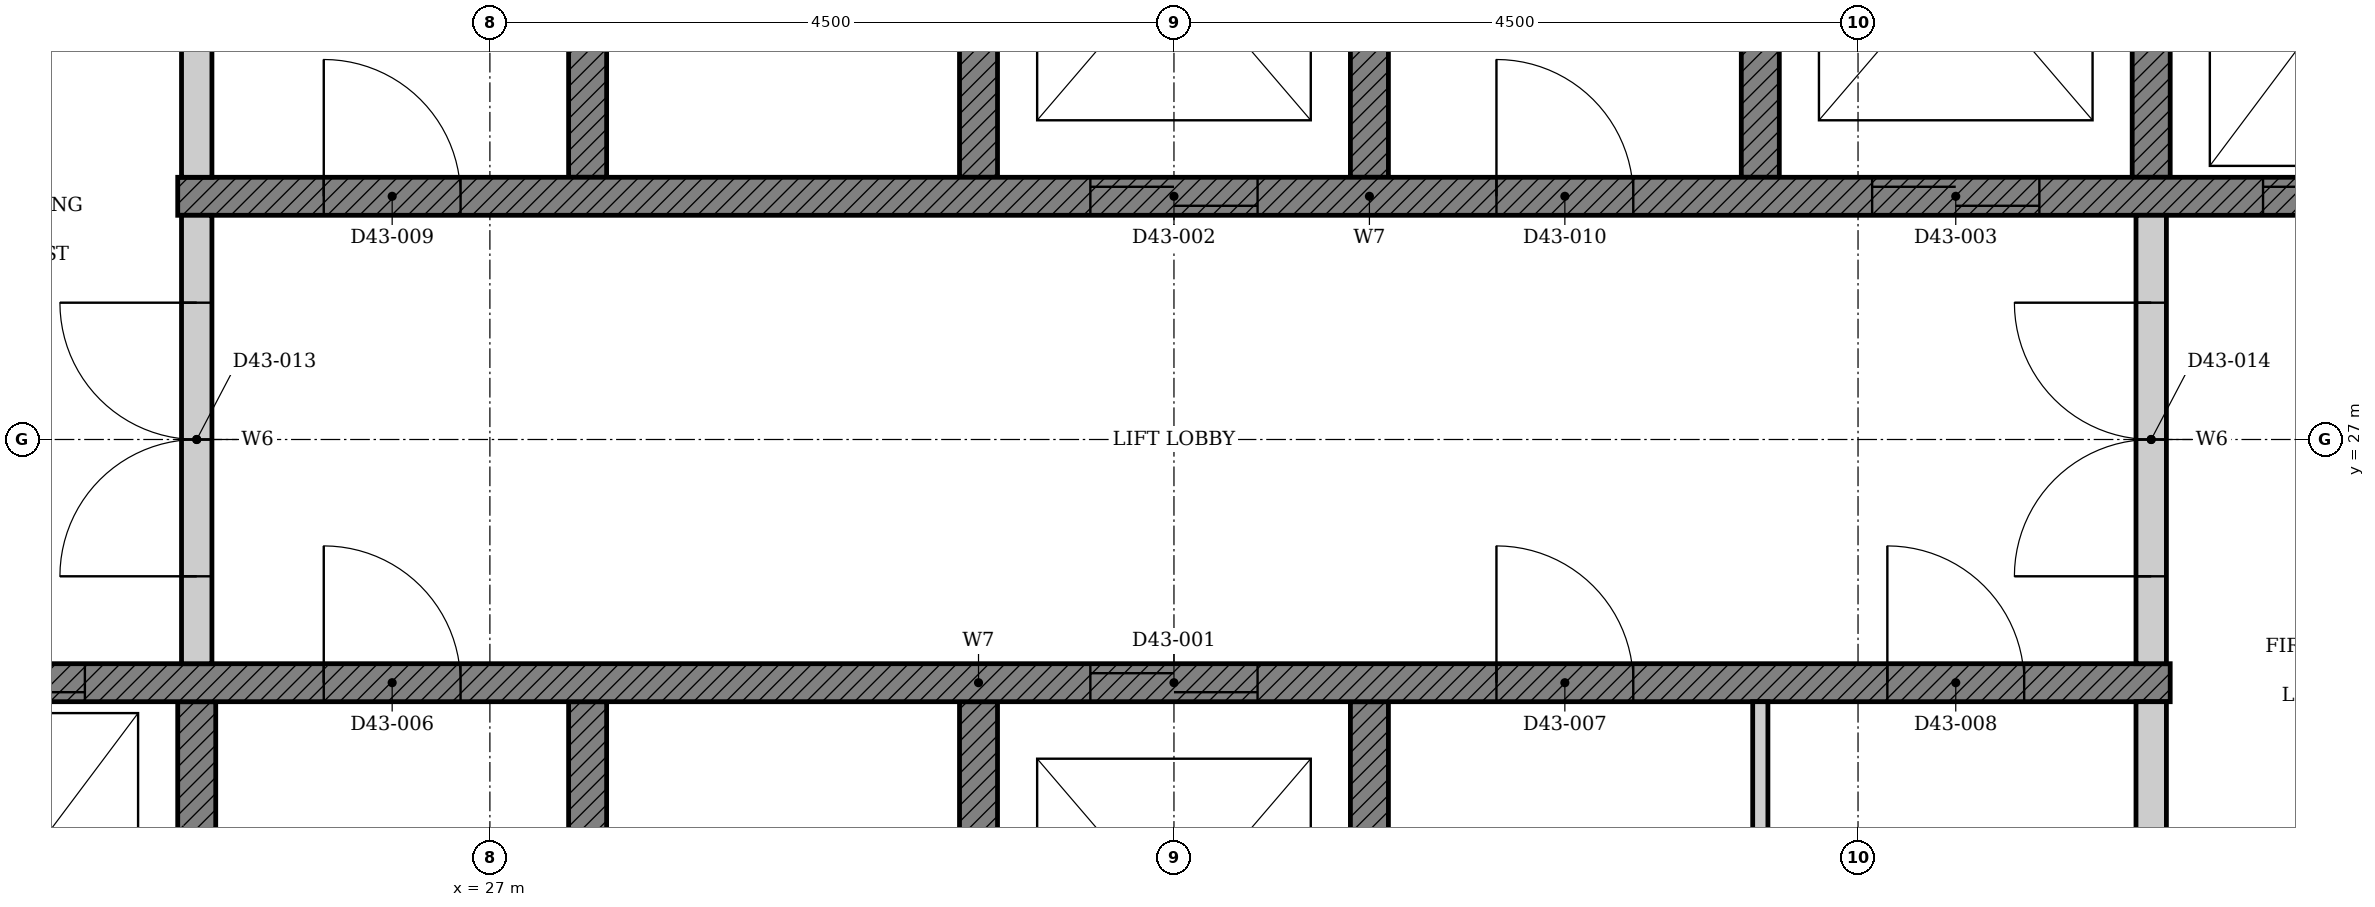
"""IFC4 building model, lengths in metres.
Left out: names, types, materials, properties, quantities, classifications, styles, units other than length and angle.
Written with IfcOpenShell. Run it as: python <this file> out.ifc"""

import sys

from ifc_helpers import new_model, si_unit, direction, frame, frame_2d, origin, place, context, subcontext, project, spatial, polyline, rectangle, outline, extrude, element, fill, save


model = new_model("IFC4")
c1 = context("Model", 3, precision=1e-05, world=origin(), true_north=direction((0.0, 1.0)))
c2 = subcontext(c1, "Body", "Model", "MODEL_VIEW")
j1 = project(units=[si_unit("LENGTHUNIT", "METRE"), si_unit("PLANEANGLEUNIT", "RADIAN")], contexts=[c1])
p1 = place(None, origin())
s1 = spatial("IfcSite", under=j1, at=p1, CompositionType="ELEMENT")
p2 = place(p1, origin())
s2 = spatial("IfcBuilding", under=s1, at=p2, CompositionType="ELEMENT")
p3 = place(p2, frame((0.0, 0.0, 172.8)))
s3 = spatial("IfcBuildingStorey", under=s2, at=p3, CompositionType="ELEMENT", Elevation=172.8)
p4 = place(p3, origin())
e1 = element("IfcWall", 1, at=p4, inside=s3, PredefinedType="SHEAR", context=c2, shape_type="SweptSolid", body=[
    extrude(outline(polyline([(22.375, 22.35), (25.197, 22.35), (25.197, 25.275), (24.947, 25.275), (24.947, 22.65), (22.625, 22.65), (22.625, 25.275), (22.375, 25.275), (22.375, 22.35)])), origin(), (0.0, 0.0, 1.0), 3.4),
])
p5 = place(p3, origin())
e2 = element("IfcWall", 2, at=p5, inside=s3, PredefinedType="SHEAR", context=c2, shape_type="SweptSolid", body=[
    extrude(outline(polyline([(27.518, 22.35), (32.911, 22.35), (32.911, 25.275), (32.661, 25.275), (32.661, 22.65), (30.339, 22.65), (30.339, 25.275), (30.089, 25.275), (30.089, 22.65), (27.768, 22.65), (27.768, 25.275), (27.518, 25.275), (27.518, 22.35)])), origin(), (0.0, 0.0, 1.0), 3.4),
])
p6 = place(p3, origin())
e3 = element("IfcWall", 3, at=p6, inside=s3, PredefinedType="SHEAR", context=c2, shape_type="SweptSolid", body=[
    extrude(outline(polyline([(27.518, 28.725), (27.768, 28.725), (27.768, 31.35), (30.089, 31.35), (30.089, 28.725), (30.339, 28.725), (30.339, 31.35), (32.661, 31.35), (32.661, 28.725), (32.911, 28.725), (32.911, 31.65), (27.518, 31.65), (27.518, 28.725)])), origin(), (0.0, 0.0, 1.0), 3.4),
])
p7 = place(p3, origin())
e4 = element("IfcWall", 4, at=p7, inside=s3, PredefinedType="SHEAR", context=c2, shape_type="SweptSolid", body=[
    extrude(outline(polyline([(35.232, 28.725), (35.482, 28.725), (35.482, 31.35), (37.803, 31.35), (37.803, 28.725), (38.053, 28.725), (38.053, 31.35), (40.375, 31.35), (40.375, 28.725), (40.625, 28.725), (40.625, 31.65), (35.232, 31.65), (35.232, 28.725)])), origin(), (0.0, 0.0, 1.0), 3.4),
])
p8 = place(p3, frame((22.375, 25.4, 0.0), z_axis=(0.0, 0.0, 1.0), x_axis=(1.0, 0.0, 0.0)))
e5 = element("IfcWall", 5, at=p8, inside=s3, PredefinedType="SHEAR", context=c2, shape_type="SweptSolid", body=[
    extrude(rectangle(XDim=15.678, YDim=0.25, at=frame_2d((7.839, 0.0))), origin(), (0.0, 0.0, 1.0), 3.4),
])
p9 = place(p8, frame((8.575, 0.0, 0.0)))
e6 = element("IfcOpeningElement", 6, at=p9, cuts=e5, PredefinedType="OPENING", context=c2, shape_type="SweptSolid", body=[
    extrude(rectangle(XDim=1.1, YDim=2.1, at=frame_2d((0.55, 1.05))), frame((0.0, 0.135, 0.0), z_axis=(0.0, -1.0, 0.0), x_axis=(1.0, 0.0, 0.0)), (0.0, 0.0, 1.0), 0.27),
])
p10 = place(p8, frame((0.861, 0.0, 0.0)))
e7 = element("IfcOpeningElement", 7, at=p10, cuts=e5, PredefinedType="OPENING", context=c2, shape_type="SweptSolid", body=[
    extrude(rectangle(XDim=1.1, YDim=2.1, at=frame_2d((0.55, 1.05))), frame((0.0, 0.135, 0.0), z_axis=(0.0, -1.0, 0.0), x_axis=(1.0, 0.0, 0.0)), (0.0, 0.0, 1.0), 0.27),
])
p11 = place(p8, frame((3.532, 0.0, 0.0)))
e8 = element("IfcOpeningElement", 8, at=p11, cuts=e5, PredefinedType="OPENING", context=c2, shape_type="SweptSolid", body=[
    extrude(rectangle(XDim=0.9, YDim=2.1, at=frame_2d((0.45, 1.05))), frame((0.0, 0.135, 0.0), z_axis=(0.0, -1.0, 0.0), x_axis=(1.0, 0.0, 0.0)), (0.0, 0.0, 1.0), 0.27),
])
p12 = place(p8, frame((11.246, 0.0, 0.0)))
e9 = element("IfcOpeningElement", 9, at=p12, cuts=e5, PredefinedType="OPENING", context=c2, shape_type="SweptSolid", body=[
    extrude(rectangle(XDim=0.9, YDim=2.1, at=frame_2d((0.45, 1.05))), frame((0.0, 0.135, 0.0), z_axis=(0.0, -1.0, 0.0), x_axis=(1.0, 0.0, 0.0)), (0.0, 0.0, 1.0), 0.27),
])
p13 = place(p8, frame((13.818, 0.0, 0.0)))
e10 = element("IfcOpeningElement", 10, at=p13, cuts=e5, PredefinedType="OPENING", context=c2, shape_type="SweptSolid", body=[
    extrude(rectangle(XDim=0.9, YDim=2.1, at=frame_2d((0.45, 1.05))), frame((0.0, 0.135, 0.0), z_axis=(0.0, -1.0, 0.0), x_axis=(1.0, 0.0, 0.0)), (0.0, 0.0, 1.0), 0.27),
])
p14 = place(p3, frame((24.947, 28.6, 0.0), z_axis=(0.0, 0.0, 1.0), x_axis=(1.0, 0.0, 0.0)))
e11 = element("IfcWall", 11, at=p14, inside=s3, PredefinedType="SHEAR", context=c2, shape_type="SweptSolid", body=[
    extrude(rectangle(XDim=15.678, YDim=0.25, at=frame_2d((7.839, 0.0))), origin(), (0.0, 0.0, 1.0), 3.4),
])
p15 = place(p14, frame((6.004, 0.0, 0.0)))
e12 = element("IfcOpeningElement", 12, at=p15, cuts=e11, PredefinedType="OPENING", context=c2, shape_type="SweptSolid", body=[
    extrude(rectangle(XDim=1.1, YDim=2.1, at=frame_2d((0.55, 1.05))), frame((0.0, 0.135, 0.0), z_axis=(0.0, -1.0, 0.0), x_axis=(1.0, 0.0, 0.0)), (0.0, 0.0, 1.0), 0.27),
])
p16 = place(p14, frame((11.146, 0.0, 0.0)))
e13 = element("IfcOpeningElement", 13, at=p16, cuts=e11, PredefinedType="OPENING", context=c2, shape_type="SweptSolid", body=[
    extrude(rectangle(XDim=1.1, YDim=2.1, at=frame_2d((0.55, 1.05))), frame((0.0, 0.135, 0.0), z_axis=(0.0, -1.0, 0.0), x_axis=(1.0, 0.0, 0.0)), (0.0, 0.0, 1.0), 0.27),
])
p17 = place(p14, frame((13.718, 0.0, 0.0)))
e14 = element("IfcOpeningElement", 14, at=p17, cuts=e11, PredefinedType="OPENING", context=c2, shape_type="SweptSolid", body=[
    extrude(rectangle(XDim=1.1, YDim=2.1, at=frame_2d((0.55, 1.05))), frame((0.0, 0.135, 0.0), z_axis=(0.0, -1.0, 0.0), x_axis=(1.0, 0.0, 0.0)), (0.0, 0.0, 1.0), 0.27),
])
p18 = place(p14, frame((0.961, 0.0, 0.0)))
e15 = element("IfcOpeningElement", 15, at=p18, cuts=e11, PredefinedType="OPENING", context=c2, shape_type="SweptSolid", body=[
    extrude(rectangle(XDim=0.9, YDim=2.1, at=frame_2d((0.45, 1.05))), frame((0.0, 0.135, 0.0), z_axis=(0.0, -1.0, 0.0), x_axis=(1.0, 0.0, 0.0)), (0.0, 0.0, 1.0), 0.27),
])
p19 = place(p14, frame((8.675, 0.0, 0.0)))
e16 = element("IfcOpeningElement", 16, at=p19, cuts=e11, PredefinedType="OPENING", context=c2, shape_type="SweptSolid", body=[
    extrude(rectangle(XDim=0.9, YDim=2.1, at=frame_2d((0.45, 1.05))), frame((0.0, 0.135, 0.0), z_axis=(0.0, -1.0, 0.0), x_axis=(1.0, 0.0, 0.0)), (0.0, 0.0, 1.0), 0.27),
])
p20 = place(p3, frame((37.928, 22.65, 0.0), z_axis=(0.0, 0.0, 1.0), x_axis=(0.0, 1.0, 0.0)))
e17 = element("IfcWall", 17, at=p20, inside=s3, PredefinedType="PARTITIONING", context=c2, shape_type="SweptSolid", body=[
    extrude(rectangle(XDim=2.625, YDim=0.2, at=frame_2d((1.312, 0.0))), origin(), (0.0, 0.0, 1.0), 3.4),
])
p21 = place(p3, frame((35.357, 22.65, 0.0), z_axis=(0.0, 0.0, 1.0), x_axis=(0.0, 1.0, 0.0)))
e18 = element("IfcWall", 18, at=p21, inside=s3, PredefinedType="PARTITIONING", context=c2, shape_type="SweptSolid", body=[
    extrude(rectangle(XDim=2.625, YDim=0.1, at=frame_2d((1.312, 0.0))), origin(), (0.0, 0.0, 1.0), 3.4),
])
p22 = place(p3, frame((25.072, 28.725, 0.0), z_axis=(0.0, 0.0, 1.0), x_axis=(0.0, 1.0, 0.0)))
e19 = element("IfcWall", 19, at=p22, inside=s3, PredefinedType="PARTITIONING", context=c2, shape_type="SweptSolid", body=[
    extrude(rectangle(XDim=2.625, YDim=0.2, at=frame_2d((1.312, 0.0))), origin(), (0.0, 0.0, 1.0), 3.4),
])
p23 = place(p3, frame((25.072, 25.525, 0.0), z_axis=(0.0, 0.0, 1.0), x_axis=(0.0, 1.0, 0.0)))
e20 = element("IfcWall", 20, at=p23, inside=s3, PredefinedType="PARTITIONING", context=c2, shape_type="SweptSolid", body=[
    extrude(rectangle(XDim=2.95, YDim=0.2, at=frame_2d((1.475, 0.0))), origin(), (0.0, 0.0, 1.0), 3.4),
])
p24 = place(p23, frame((0.575, 0.0, 0.0)))
e21 = element("IfcOpeningElement", 21, at=p24, cuts=e20, PredefinedType="OPENING", context=c2, shape_type="SweptSolid", body=[
    extrude(rectangle(XDim=1.8, YDim=2.1, at=frame_2d((0.9, 1.05))), frame((0.0, 0.11, 0.0), z_axis=(0.0, -1.0, 0.0), x_axis=(1.0, 0.0, 0.0)), (0.0, 0.0, 1.0), 0.22),
])
p25 = place(p3, frame((37.928, 25.525, 0.0), z_axis=(0.0, 0.0, 1.0), x_axis=(0.0, 1.0, 0.0)))
e22 = element("IfcWall", 22, at=p25, inside=s3, PredefinedType="PARTITIONING", context=c2, shape_type="SweptSolid", body=[
    extrude(rectangle(XDim=2.95, YDim=0.2, at=frame_2d((1.475, 0.0))), origin(), (0.0, 0.0, 1.0), 3.4),
])
p26 = place(p25, frame((0.575, 0.0, 0.0)))
e23 = element("IfcOpeningElement", 23, at=p26, cuts=e22, PredefinedType="OPENING", context=c2, shape_type="SweptSolid", body=[
    extrude(rectangle(XDim=1.8, YDim=2.1, at=frame_2d((0.9, 1.05))), frame((0.0, 0.11, 0.0), z_axis=(0.0, -1.0, 0.0), x_axis=(1.0, 0.0, 0.0)), (0.0, 0.0, 1.0), 0.22),
])
p27 = place(p9, origin())
e24 = element("IfcDoor", 24, at=p27, inside=s3, OperationType="DOUBLE_DOOR_SLIDING", PredefinedType="DOOR", context=c2, shape_type="SweptSolid", body=[
    extrude(rectangle(XDim=1.1, YDim=2.1, at=frame_2d((0.55, 1.05))), frame((0.0, 0.025, 0.0), z_axis=(0.0, -1.0, 0.0), x_axis=(1.0, 0.0, 0.0)), (0.0, 0.0, 1.0), 0.05),
])
fill(e6, e24)
p28 = place(p15, origin())
e25 = element("IfcDoor", 25, at=p28, inside=s3, OperationType="DOUBLE_DOOR_SLIDING", PredefinedType="DOOR", context=c2, shape_type="SweptSolid", body=[
    extrude(rectangle(XDim=1.1, YDim=2.1, at=frame_2d((0.55, 1.05))), frame((0.0, 0.025, 0.0), z_axis=(0.0, -1.0, 0.0), x_axis=(1.0, 0.0, 0.0)), (0.0, 0.0, 1.0), 0.05),
])
fill(e12, e25)
p29 = place(p16, origin())
e26 = element("IfcDoor", 26, at=p29, inside=s3, OperationType="DOUBLE_DOOR_SLIDING", PredefinedType="DOOR", context=c2, shape_type="SweptSolid", body=[
    extrude(rectangle(XDim=1.1, YDim=2.1, at=frame_2d((0.55, 1.05))), frame((0.0, 0.025, 0.0), z_axis=(0.0, -1.0, 0.0), x_axis=(1.0, 0.0, 0.0)), (0.0, 0.0, 1.0), 0.05),
])
fill(e13, e26)
p30 = place(p10, origin())
e27 = element("IfcDoor", 27, at=p30, inside=s3, OperationType="DOUBLE_DOOR_SLIDING", PredefinedType="DOOR", context=c2, shape_type="SweptSolid", body=[
    extrude(rectangle(XDim=1.1, YDim=2.1, at=frame_2d((0.55, 1.05))), frame((0.0, 0.025, 0.0), z_axis=(0.0, -1.0, 0.0), x_axis=(1.0, 0.0, 0.0)), (0.0, 0.0, 1.0), 0.05),
])
fill(e7, e27)
p31 = place(p17, origin())
e28 = element("IfcDoor", 28, at=p31, inside=s3, OperationType="DOUBLE_DOOR_SLIDING", PredefinedType="DOOR", context=c2, shape_type="SweptSolid", body=[
    extrude(rectangle(XDim=1.1, YDim=2.1, at=frame_2d((0.55, 1.05))), frame((0.0, 0.025, 0.0), z_axis=(0.0, -1.0, 0.0), x_axis=(1.0, 0.0, 0.0)), (0.0, 0.0, 1.0), 0.05),
])
fill(e14, e28)
p32 = place(p11, origin())
e29 = element("IfcDoor", 29, at=p32, inside=s3, OperationType="SINGLE_SWING_LEFT", PredefinedType="DOOR", context=c2, shape_type="SweptSolid", body=[
    extrude(rectangle(XDim=0.9, YDim=2.1, at=frame_2d((0.45, 1.05))), frame((0.0, 0.025, 0.0), z_axis=(0.0, -1.0, 0.0), x_axis=(1.0, 0.0, 0.0)), (0.0, 0.0, 1.0), 0.05),
])
fill(e8, e29)
p33 = place(p12, origin())
e30 = element("IfcDoor", 30, at=p33, inside=s3, OperationType="SINGLE_SWING_LEFT", PredefinedType="DOOR", context=c2, shape_type="SweptSolid", body=[
    extrude(rectangle(XDim=0.9, YDim=2.1, at=frame_2d((0.45, 1.05))), frame((0.0, 0.025, 0.0), z_axis=(0.0, -1.0, 0.0), x_axis=(1.0, 0.0, 0.0)), (0.0, 0.0, 1.0), 0.05),
])
fill(e9, e30)
p34 = place(p13, origin())
e31 = element("IfcDoor", 31, at=p34, inside=s3, OperationType="SINGLE_SWING_LEFT", PredefinedType="DOOR", context=c2, shape_type="SweptSolid", body=[
    extrude(rectangle(XDim=0.9, YDim=2.1, at=frame_2d((0.45, 1.05))), frame((0.0, 0.025, 0.0), z_axis=(0.0, -1.0, 0.0), x_axis=(1.0, 0.0, 0.0)), (0.0, 0.0, 1.0), 0.05),
])
fill(e10, e31)
p35 = place(p18, origin())
e32 = element("IfcDoor", 32, at=p35, inside=s3, OperationType="SINGLE_SWING_LEFT", PredefinedType="DOOR", context=c2, shape_type="SweptSolid", body=[
    extrude(rectangle(XDim=0.9, YDim=2.1, at=frame_2d((0.45, 1.05))), frame((0.0, 0.025, 0.0), z_axis=(0.0, -1.0, 0.0), x_axis=(1.0, 0.0, 0.0)), (0.0, 0.0, 1.0), 0.05),
])
fill(e15, e32)
p36 = place(p19, origin())
e33 = element("IfcDoor", 33, at=p36, inside=s3, OperationType="SINGLE_SWING_LEFT", PredefinedType="DOOR", context=c2, shape_type="SweptSolid", body=[
    extrude(rectangle(XDim=0.9, YDim=2.1, at=frame_2d((0.45, 1.05))), frame((0.0, 0.025, 0.0), z_axis=(0.0, -1.0, 0.0), x_axis=(1.0, 0.0, 0.0)), (0.0, 0.0, 1.0), 0.05),
])
fill(e16, e33)
p37 = place(p24, origin())
e34 = element("IfcDoor", 34, at=p37, inside=s3, OperationType="DOUBLE_DOOR_SINGLE_SWING", PredefinedType="DOOR", context=c2, shape_type="SweptSolid", body=[
    extrude(rectangle(XDim=1.8, YDim=2.1, at=frame_2d((0.9, 1.05))), frame((0.0, 0.025, 0.0), z_axis=(0.0, -1.0, 0.0), x_axis=(1.0, 0.0, 0.0)), (0.0, 0.0, 1.0), 0.05),
])
fill(e21, e34)
p38 = place(p26, origin())
e35 = element("IfcDoor", 35, at=p38, inside=s3, OperationType="DOUBLE_DOOR_SINGLE_SWING", PredefinedType="DOOR", context=c2, shape_type="SweptSolid", body=[
    extrude(rectangle(XDim=1.8, YDim=2.1, at=frame_2d((0.9, 1.05))), frame((0.0, 0.025, 0.0), z_axis=(0.0, -1.0, 0.0), x_axis=(1.0, 0.0, 0.0)), (0.0, 0.0, 1.0), 0.05),
])
fill(e23, e35)
save(model, sys.argv[1])
